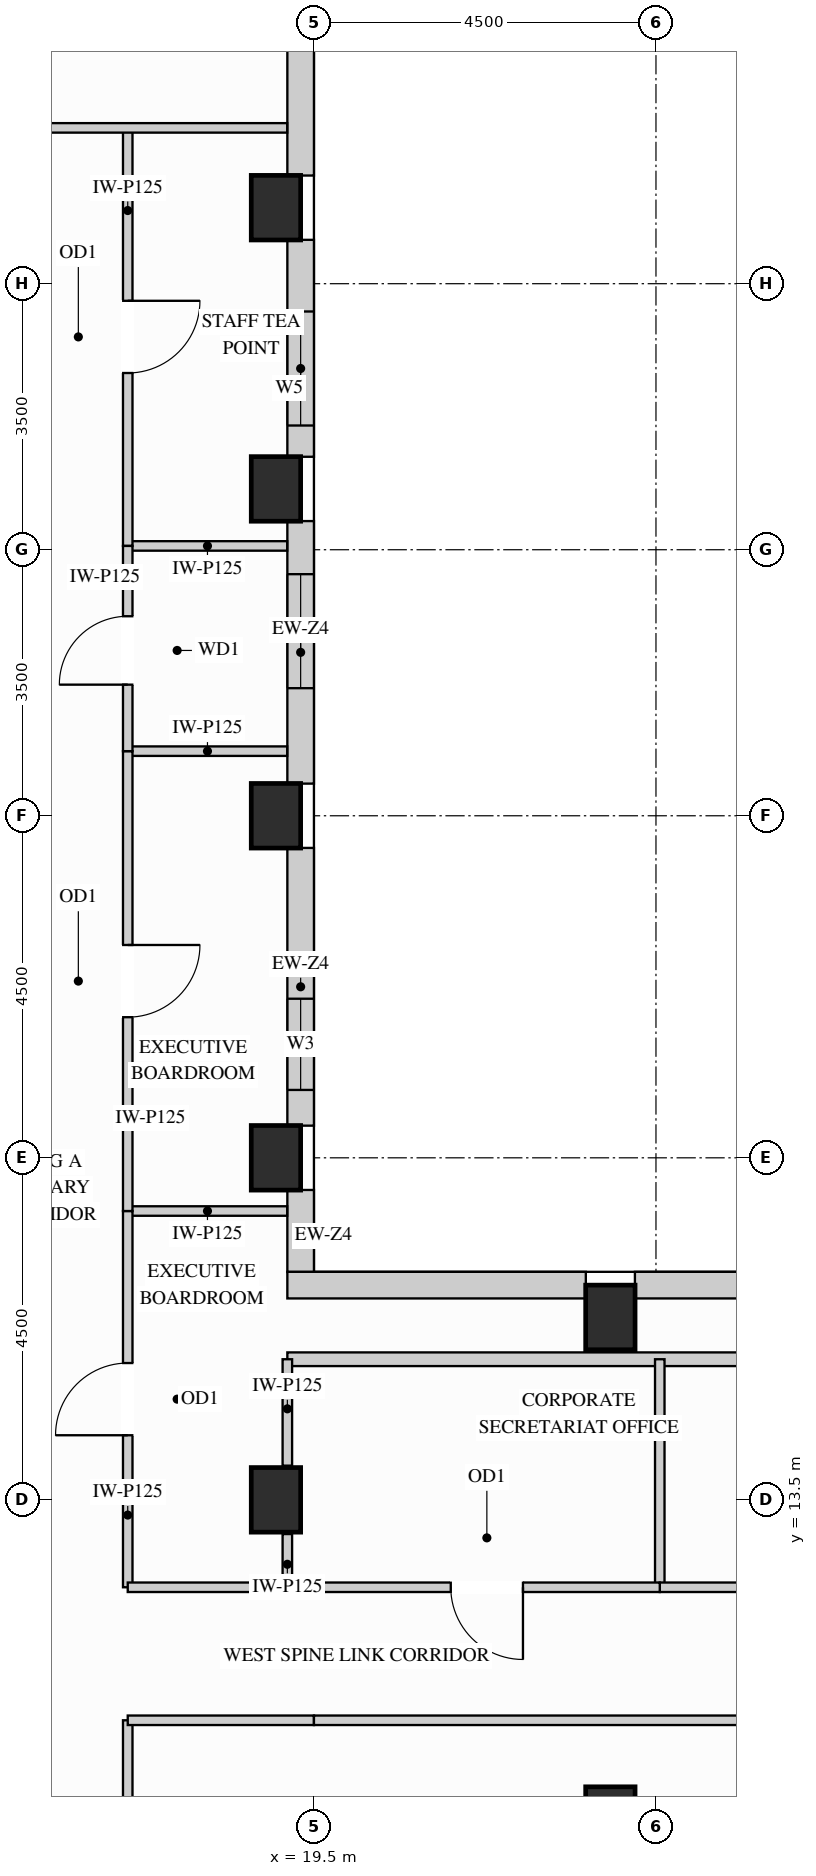
"""IFC4 building model, lengths in metres.
Left out: names, types, materials, properties, quantities, classifications, styles, units other than length and angle.
Written with IfcOpenShell. Run it as: python <this file> out.ifc"""

import sys

from ifc_helpers import new_model, si_unit, direction, frame, frame_2d, origin, origin_2d, place, context, subcontext, project, spatial, rectangle, extrude, source, transform, mapped, element, fill, save


model = new_model("IFC4")
c1 = context("Model", 3, precision=1e-05, world=origin(), true_north=direction((0.0, 1.0)))
c2 = subcontext(c1, "Body", "Model", "MODEL_VIEW")
j1 = project(units=[si_unit("LENGTHUNIT", "METRE"), si_unit("PLANEANGLEUNIT", "RADIAN")], contexts=[c1])
p1 = place(None, origin())
s1 = spatial("IfcSite", under=j1, at=p1, CompositionType="ELEMENT")
p2 = place(p1, origin())
s2 = spatial("IfcBuilding", under=s1, at=p2, CompositionType="ELEMENT")
p3 = place(p2, frame((0.0, 0.0, 244.8)))
s3 = spatial("IfcBuildingStorey", under=s2, at=p3, CompositionType="ELEMENT", Elevation=244.8)
m1 = source(origin(), c2, "Body", "SweptSolid", [
    extrude(rectangle(XDim=0.65, YDim=0.85, at=origin_2d()), origin(), (0.0, 0.0, 1.0), 3.4),
])
for number, where, z_axis, x_axis in (
    (1, (19.0, 13.5, 0.0), (0.0, 0.0, 1.0), (1.0, 0.0, 0.0)),
    (2, (19.0, 18.0, 0.0), (0.0, 0.0, 1.0), (1.0, 0.0, 0.0)),
    (3, (19.0, 22.5, 0.0), (0.0, 0.0, 1.0), (1.0, 0.0, 0.0)),
    (4, (19.0, 26.8, 0.0), (0.0, 0.0, 1.0), (1.0, 0.0, 0.0)),
    (5, (19.0, 30.5, 0.0), (0.0, 0.0, 1.0), (1.0, 0.0, 0.0)),
    (6, (23.4, 15.9, 0.0), (0.0, 0.0, 1.0), (1.0, 0.0, 0.0)),
    (7, (23.4, 9.3, 0.0), (0.0, 0.0, 1.0), (1.0, 0.0, 0.0)),
):
    element("IfcColumn", number, at=place(p3, frame(where, z_axis=z_axis, x_axis=x_axis)), inside=s3, PredefinedType="COLUMN", context=c2, shape_type="MappedRepresentation", body=[
        mapped(m1, transform((0.0, 0.0, 0.0), x_axis=(1.0, 0.0, 0.0), y_axis=(0.0, 1.0, 0.0), z_axis=(0.0, 0.0, 1.0))),
    ])
m2 = source(origin(), c2, "Body", "SweptSolid", [
    extrude(rectangle(XDim=1.079, YDim=0.35, at=frame_2d((0.54, 0.0))), origin(), (0.0, 0.0, 1.0), 2.619),
])
p4 = place(p3, frame((19.325, 16.498, 0.0), z_axis=(0.0, 0.0, 1.0), x_axis=(0.0, 1.0, 0.0)))
e8 = element("IfcWall", 8, at=p4, inside=s3, PredefinedType="SOLIDWALL", context=c2, shape_type="MappedRepresentation", body=[
    mapped(m2, transform((0.0, 0.0, 0.0), x_axis=(1.0, 0.0, 0.0), y_axis=(0.0, 1.0, 0.0), z_axis=(0.0, 0.0, 1.0))),
])
p5 = place(p3, frame((19.325, 18.423, 0.0), z_axis=(0.0, 0.0, 1.0), x_axis=(0.0, 1.0, 0.0)))
e9 = element("IfcWall", 9, at=p5, inside=s3, PredefinedType="SOLIDWALL", context=c2, shape_type="SweptSolid", body=[
    extrude(rectangle(XDim=3.654, YDim=0.35, at=frame_2d((1.827, 0.0))), origin(), (0.0, 0.0, 1.0), 2.619),
])
p6 = place(p5, frame((0.47, 0.0, 0.78)))
e10 = element("IfcOpeningElement", 10, at=p6, cuts=e9, PredefinedType="OPENING", context=c2, shape_type="SweptSolid", body=[
    extrude(rectangle(XDim=1.2, YDim=1.659, at=frame_2d((0.6, 0.83))), frame((0.0, 0.185, 0.0), z_axis=(0.0, -1.0, 0.0), x_axis=(1.0, 0.0, 0.0)), (0.0, 0.0, 1.0), 0.37),
])
p7 = place(p3, frame((19.325, 22.923, 0.0), z_axis=(0.0, 0.0, 1.0), x_axis=(0.0, 1.0, 0.0)))
e11 = element("IfcWall", 11, at=p7, inside=s3, PredefinedType="SOLIDWALL", context=c2, shape_type="SweptSolid", body=[
    extrude(rectangle(XDim=3.454, YDim=0.35, at=frame_2d((1.727, 0.0))), origin(), (0.0, 0.0, 1.0), 2.619),
])
p8 = place(p7, frame((1.256, 0.0, 0.78)))
e12 = element("IfcOpeningElement", 12, at=p8, cuts=e11, PredefinedType="OPENING", context=c2, shape_type="SweptSolid", body=[
    extrude(rectangle(XDim=1.5, YDim=1.659, at=frame_2d((0.75, 0.83))), frame((0.0, 0.185, 0.0), z_axis=(0.0, -1.0, 0.0), x_axis=(1.0, 0.0, 0.0)), (0.0, 0.0, 1.0), 0.37),
])
p9 = place(p3, frame((19.325, 27.223, 0.0), z_axis=(0.0, 0.0, 1.0), x_axis=(0.0, 1.0, 0.0)))
e13 = element("IfcWall", 13, at=p9, inside=s3, PredefinedType="SOLIDWALL", context=c2, shape_type="SweptSolid", body=[
    extrude(rectangle(XDim=2.854, YDim=0.35, at=frame_2d((1.427, 0.0))), origin(), (0.0, 0.0, 1.0), 2.619),
])
p10 = place(p9, frame((0.411, 0.0, 0.78)))
e14 = element("IfcOpeningElement", 14, at=p10, cuts=e13, PredefinedType="OPENING", context=c2, shape_type="SweptSolid", body=[
    extrude(rectangle(XDim=1.5, YDim=1.659, at=frame_2d((0.75, 0.83))), frame((0.0, 0.185, 0.0), z_axis=(0.0, -1.0, 0.0), x_axis=(1.0, 0.0, 0.0)), (0.0, 0.0, 1.0), 0.37),
])
m3 = source(origin(), c2, "Body", "SweptSolid", [
    extrude(rectangle(XDim=3.654, YDim=0.35, at=frame_2d((1.827, 0.0))), origin(), (0.0, 0.0, 1.0), 2.619),
])
p11 = place(p3, frame((19.325, 30.923, 0.0), z_axis=(0.0, 0.0, 1.0), x_axis=(0.0, 1.0, 0.0)))
e15 = element("IfcWall", 15, at=p11, inside=s3, PredefinedType="SOLIDWALL", context=c2, shape_type="MappedRepresentation", body=[
    mapped(m3, transform((0.0, 0.0, 0.0), x_axis=(1.0, 0.0, 0.0), y_axis=(0.0, 1.0, 0.0), z_axis=(0.0, 0.0, 1.0))),
])
m4 = source(origin(), c2, "Body", "SweptSolid", [
    extrude(rectangle(XDim=6.454, YDim=0.35, at=frame_2d((3.227, 0.0))), origin(), (0.0, 0.0, 1.0), 3.385),
])
p12 = place(p3, frame((30.177, 16.325, 0.0), z_axis=(0.0, 0.0, 1.0), x_axis=(-1.0, 0.0, 0.0)))
e16 = element("IfcWall", 16, at=p12, inside=s3, PredefinedType="SOLIDWALL", context=c2, shape_type="MappedRepresentation", body=[
    mapped(m4, transform((0.0, 0.0, 0.0), x_axis=(1.0, 0.0, 0.0), y_axis=(0.0, 1.0, 0.0), z_axis=(0.0, 0.0, 1.0))),
])
m5 = source(origin(), c2, "Body", "SweptSolid", [
    extrude(rectangle(XDim=3.927, YDim=0.35, at=frame_2d((1.963, 0.0))), origin(), (0.0, 0.0, 1.0), 3.385),
])
p13 = place(p3, frame((23.077, 16.325, 0.0), z_axis=(0.0, 0.0, 1.0), x_axis=(-1.0, 0.0, 0.0)))
e17 = element("IfcWall", 17, at=p13, inside=s3, PredefinedType="SOLIDWALL", context=c2, shape_type="MappedRepresentation", body=[
    mapped(m5, transform((0.0, 0.0, 0.0), x_axis=(1.0, 0.0, 0.0), y_axis=(0.0, 1.0, 0.0), z_axis=(0.0, 0.0, 1.0))),
])
m6 = source(origin(), c2, "Body", "SweptSolid", [
    extrude(rectangle(XDim=15.25, YDim=0.18, at=frame_2d((7.625, 0.0))), origin(), (0.0, 0.0, 1.0), 3.385),
])
p14 = place(p3, frame((19.15, 15.35, 0.0), z_axis=(0.0, 0.0, 1.0), x_axis=(1.0, 0.0, 0.0)))
e18 = element("IfcWall", 18, at=p14, inside=s3, PredefinedType="PARTITIONING", context=c2, shape_type="MappedRepresentation", body=[
    mapped(m6, transform((0.0, 0.0, 0.0), x_axis=(1.0, 0.0, 0.0), y_axis=(0.0, 1.0, 0.0), z_axis=(0.0, 0.0, 1.0))),
])
m7 = source(origin(), c2, "Body", "SweptSolid", [
    extrude(rectangle(XDim=2.098, YDim=0.125, at=frame_2d((1.049, 0.0))), origin(), (0.0, 0.0, 1.0), 3.385),
])
for number, where, z_axis, x_axis in (
    (19, (17.05, 17.3, 0.0), (0.0, 0.0, 1.0), (1.0, 0.0, 0.0)),
    (20, (17.05, 23.35, 0.0), (0.0, 0.0, 1.0), (1.0, 0.0, 0.0)),
    (21, (17.05, 26.05, 0.0), (0.0, 0.0, 1.0), (1.0, 0.0, 0.0)),
):
    element("IfcWall", number, at=place(p3, frame(where, z_axis=z_axis, x_axis=x_axis)), inside=s3, PredefinedType="PARTITIONING", context=c2, shape_type="MappedRepresentation", body=[
        mapped(m7, transform((0.0, 0.0, 0.0), x_axis=(1.0, 0.0, 0.0), y_axis=(0.0, 1.0, 0.0), z_axis=(0.0, 0.0, 1.0))),
    ])
m8 = source(origin(), c2, "Body", "SweptSolid", [
    extrude(rectangle(XDim=0.7, YDim=0.125, at=frame_2d((0.35, 0.0))), origin(), (0.0, 0.0, 1.0), 2.773),
])
p15 = place(p3, frame((19.15, 12.35, 0.0), z_axis=(0.0, 0.0, 1.0), x_axis=(0.0, 1.0, 0.0)))
e22 = element("IfcWall", 22, at=p15, inside=s3, PredefinedType="PARTITIONING", context=c2, shape_type="MappedRepresentation", body=[
    mapped(m8, transform((0.0, 0.0, 0.0), x_axis=(1.0, 0.0, 0.0), y_axis=(0.0, 1.0, 0.0), z_axis=(0.0, 0.0, 1.0))),
])
m9 = source(origin(), c2, "Body", "SweptSolid", [
    extrude(rectangle(XDim=1.4, YDim=0.125, at=frame_2d((0.7, 0.0))), origin(), (0.0, 0.0, 1.0), 2.619),
])
p16 = place(p3, frame((19.15, 13.95, 0.0), z_axis=(0.0, 0.0, 1.0), x_axis=(0.0, 1.0, 0.0)))
e23 = element("IfcWall", 23, at=p16, inside=s3, PredefinedType="PARTITIONING", context=c2, shape_type="MappedRepresentation", body=[
    mapped(m9, transform((0.0, 0.0, 0.0), x_axis=(1.0, 0.0, 0.0), y_axis=(0.0, 1.0, 0.0), z_axis=(0.0, 0.0, 1.0))),
])
p17 = place(p3, frame((17.05, 12.35, 0.0), z_axis=(0.0, 0.0, 1.0), x_axis=(0.0, 1.0, 0.0)))
e24 = element("IfcWall", 24, at=p17, inside=s3, PredefinedType="PARTITIONING", context=c2, shape_type="SweptSolid", body=[
    extrude(rectangle(XDim=4.95, YDim=0.125, at=frame_2d((2.475, 0.0))), origin(), (0.0, 0.0, 1.0), 3.385),
])
p18 = place(p17, frame((2.0, 0.0, 0.0)))
e25 = element("IfcOpeningElement", 25, at=p18, cuts=e24, PredefinedType="OPENING", context=c2, shape_type="SweptSolid", body=[
    extrude(rectangle(XDim=0.95, YDim=2.15, at=frame_2d((0.475, 1.075))), frame((0.0, 0.073, 0.0), z_axis=(0.0, -1.0, 0.0), x_axis=(1.0, 0.0, 0.0)), (0.0, 0.0, 1.0), 0.145),
])
p19 = place(p3, frame((17.05, 17.3, 0.0), z_axis=(0.0, 0.0, 1.0), x_axis=(0.0, 1.0, 0.0)))
e26 = element("IfcWall", 26, at=p19, inside=s3, PredefinedType="PARTITIONING", context=c2, shape_type="SweptSolid", body=[
    extrude(rectangle(XDim=6.05, YDim=0.125, at=frame_2d((3.025, 0.0))), origin(), (0.0, 0.0, 1.0), 3.385),
])
p20 = place(p19, frame((2.55, 0.0, 0.0)))
e27 = element("IfcOpeningElement", 27, at=p20, cuts=e26, PredefinedType="OPENING", context=c2, shape_type="SweptSolid", body=[
    extrude(rectangle(XDim=0.95, YDim=2.15, at=frame_2d((0.475, 1.075))), frame((0.0, 0.073, 0.0), z_axis=(0.0, -1.0, 0.0), x_axis=(1.0, 0.0, 0.0)), (0.0, 0.0, 1.0), 0.145),
])
p21 = place(p3, frame((17.05, 26.05, 0.0), z_axis=(0.0, 0.0, 1.0), x_axis=(0.0, 1.0, 0.0)))
e28 = element("IfcWall", 28, at=p21, inside=s3, PredefinedType="PARTITIONING", context=c2, shape_type="SweptSolid", body=[
    extrude(rectangle(XDim=5.5, YDim=0.125, at=frame_2d((2.75, 0.0))), origin(), (0.0, 0.0, 1.0), 3.385),
])
p22 = place(p21, frame((2.275, 0.0, 0.0)))
e29 = element("IfcOpeningElement", 29, at=p22, cuts=e28, PredefinedType="OPENING", context=c2, shape_type="SweptSolid", body=[
    extrude(rectangle(XDim=0.95, YDim=2.15, at=frame_2d((0.475, 1.075))), frame((0.0, 0.073, 0.0), z_axis=(0.0, -1.0, 0.0), x_axis=(1.0, 0.0, 0.0)), (0.0, 0.0, 1.0), 0.145),
])
p23 = place(p3, frame((17.05, 4.95, 0.0), z_axis=(0.0, 0.0, 1.0), x_axis=(0.0, 1.0, 0.0)))
e30 = element("IfcWall", 30, at=p23, inside=s3, PredefinedType="PARTITIONING", context=c2, shape_type="SweptSolid", body=[
    extrude(rectangle(XDim=5.65, YDim=0.125, at=frame_2d((2.825, 0.0))), origin(), (0.0, 0.0, 1.0), 3.385),
])
p24 = place(p23, frame((2.35, 0.0, 0.0)))
e31 = element("IfcOpeningElement", 31, at=p24, cuts=e30, PredefinedType="OPENING", context=c2, shape_type="SweptSolid", body=[
    extrude(rectangle(XDim=0.95, YDim=2.15, at=frame_2d((0.475, 1.075))), frame((0.0, 0.073, 0.0), z_axis=(0.0, -1.0, 0.0), x_axis=(1.0, 0.0, 0.0)), (0.0, 0.0, 1.0), 0.145),
])
p25 = place(p3, frame((17.05, 23.35, 0.0), z_axis=(0.0, 0.0, 1.0), x_axis=(0.0, 1.0, 0.0)))
e32 = element("IfcWall", 32, at=p25, inside=s3, PredefinedType="PARTITIONING", context=c2, shape_type="SweptSolid", body=[
    extrude(rectangle(XDim=2.7, YDim=0.125, at=frame_2d((1.35, 0.0))), origin(), (0.0, 0.0, 1.0), 3.385),
])
p26 = place(p25, frame((0.875, 0.0, 0.0)))
e33 = element("IfcOpeningElement", 33, at=p26, cuts=e32, PredefinedType="OPENING", context=c2, shape_type="SweptSolid", body=[
    extrude(rectangle(XDim=0.9, YDim=2.15, at=frame_2d((0.45, 1.075))), frame((0.0, 0.073, 0.0), z_axis=(0.0, -1.0, 0.0), x_axis=(1.0, 0.0, 0.0)), (0.0, 0.0, 1.0), 0.145),
])
m10 = source(origin(), c2, "Body", "SweptSolid", [
    extrude(rectangle(XDim=5.798, YDim=0.125, at=frame_2d((2.899, 0.0))), origin(), (0.0, 0.0, 1.0), 3.385),
])
p27 = place(p3, frame((13.35, 31.55, 0.0), z_axis=(0.0, 0.0, 1.0), x_axis=(1.0, 0.0, 0.0)))
e34 = element("IfcWall", 34, at=p27, inside=s3, PredefinedType="PARTITIONING", context=c2, shape_type="MappedRepresentation", body=[
    mapped(m10, transform((0.0, 0.0, 0.0), x_axis=(1.0, 0.0, 0.0), y_axis=(0.0, 1.0, 0.0), z_axis=(0.0, 0.0, 1.0))),
])
m11 = source(origin(), c2, "Body", "SweptSolid", [
    extrude(rectangle(XDim=3.0, YDim=0.125, at=frame_2d((1.5, 0.0))), origin(), (0.0, 0.0, 1.0), 3.385),
])
p28 = place(p3, frame((24.05, 12.35, 0.0), z_axis=(0.0, 0.0, 1.0), x_axis=(0.0, 1.0, 0.0)))
e35 = element("IfcWall", 35, at=p28, inside=s3, PredefinedType="PARTITIONING", context=c2, shape_type="MappedRepresentation", body=[
    mapped(m11, transform((0.0, 0.0, 0.0), x_axis=(1.0, 0.0, 0.0), y_axis=(0.0, 1.0, 0.0), z_axis=(0.0, 0.0, 1.0))),
])
p29 = place(p3, frame((24.05, 12.35, 0.0), z_axis=(0.0, 0.0, 1.0), x_axis=(1.0, 0.0, 0.0)))
e36 = element("IfcWall", 36, at=p29, inside=s3, PredefinedType="PARTITIONING", context=c2, shape_type="SweptSolid", body=[
    extrude(rectangle(XDim=5.8, YDim=0.125, at=frame_2d((2.9, 0.0))), origin(), (0.0, 0.0, 1.0), 3.385),
])
p30 = place(p29, frame((2.425, 0.0, 0.0)))
e37 = element("IfcOpeningElement", 37, at=p30, cuts=e36, PredefinedType="OPENING", context=c2, shape_type="SweptSolid", body=[
    extrude(rectangle(XDim=0.95, YDim=2.15, at=frame_2d((0.475, 1.075))), frame((0.0, 0.073, 0.0), z_axis=(0.0, -1.0, 0.0), x_axis=(1.0, 0.0, 0.0)), (0.0, 0.0, 1.0), 0.145),
])
m12 = source(origin(), c2, "Body", "SweptSolid", [
    extrude(rectangle(XDim=2.45, YDim=0.125, at=frame_2d((1.225, 0.0))), origin(), (0.0, 0.0, 1.0), 3.385),
])
p31 = place(p3, frame((17.05, 12.35, 0.0), z_axis=(0.0, 0.0, 1.0), x_axis=(1.0, 0.0, 0.0)))
e38 = element("IfcWall", 38, at=p31, inside=s3, PredefinedType="PARTITIONING", context=c2, shape_type="MappedRepresentation", body=[
    mapped(m12, transform((0.0, 0.0, 0.0), x_axis=(1.0, 0.0, 0.0), y_axis=(0.0, 1.0, 0.0), z_axis=(0.0, 0.0, 1.0))),
])
p32 = place(p3, frame((19.5, 12.35, 0.0), z_axis=(0.0, 0.0, 1.0), x_axis=(1.0, 0.0, 0.0)))
e39 = element("IfcWall", 39, at=p32, inside=s3, PredefinedType="PARTITIONING", context=c2, shape_type="SweptSolid", body=[
    extrude(rectangle(XDim=4.55, YDim=0.125, at=frame_2d((2.275, 0.0))), origin(), (0.0, 0.0, 1.0), 3.385),
])
p33 = place(p32, frame((1.8, 0.0, 0.0)))
e40 = element("IfcOpeningElement", 40, at=p33, cuts=e39, PredefinedType="OPENING", context=c2, shape_type="SweptSolid", body=[
    extrude(rectangle(XDim=0.95, YDim=2.15, at=frame_2d((0.475, 1.075))), frame((0.0, 0.073, 0.0), z_axis=(0.0, -1.0, 0.0), x_axis=(1.0, 0.0, 0.0)), (0.0, 0.0, 1.0), 0.145),
])
p34 = place(p3, frame((17.05, 10.6, 0.0), z_axis=(0.0, 0.0, 1.0), x_axis=(1.0, 0.0, 0.0)))
e41 = element("IfcWall", 41, at=p34, inside=s3, PredefinedType="PARTITIONING", context=c2, shape_type="MappedRepresentation", body=[
    mapped(m12, transform((0.0, 0.0, 0.0), x_axis=(1.0, 0.0, 0.0), y_axis=(0.0, 1.0, 0.0), z_axis=(0.0, 0.0, 1.0))),
])
p35 = place(p3, frame((19.5, 10.6, 0.0), z_axis=(0.0, 0.0, 1.0), x_axis=(1.0, 0.0, 0.0)))
e42 = element("IfcWall", 42, at=p35, inside=s3, PredefinedType="PARTITIONING", context=c2, shape_type="SweptSolid", body=[
    extrude(rectangle(XDim=14.9, YDim=0.125, at=frame_2d((7.45, 0.0))), origin(), (0.0, 0.0, 1.0), 3.385),
])
p36 = place(p35, frame((6.975, 0.0, 0.0)))
e43 = element("IfcOpeningElement", 43, at=p36, cuts=e42, PredefinedType="OPENING", context=c2, shape_type="SweptSolid", body=[
    extrude(rectangle(XDim=0.95, YDim=2.15, at=frame_2d((0.475, 1.075))), frame((0.0, 0.073, 0.0), z_axis=(0.0, -1.0, 0.0), x_axis=(1.0, 0.0, 0.0)), (0.0, 0.0, 1.0), 0.145),
])
m13 = source(origin(), c2, "Body", "SweptSolid", [
    extrude(rectangle(XDim=0.95, YDim=2.15, at=frame_2d((0.475, 1.075))), frame((0.0, 0.025, 0.0), z_axis=(0.0, -1.0, 0.0), x_axis=(1.0, 0.0, 0.0)), (0.0, 0.0, 1.0), 0.05),
])
p37 = place(p18, origin())
e44 = element("IfcDoor", 44, at=p37, inside=s3, OperationType="SINGLE_SWING_LEFT", PredefinedType="DOOR", context=c2, shape_type="MappedRepresentation", body=[
    mapped(m13, transform((0.0, 0.0, 0.0), x_axis=(1.0, 0.0, 0.0), y_axis=(0.0, 1.0, 0.0), z_axis=(0.0, 0.0, 1.0))),
])
fill(e25, e44)
p38 = place(p20, origin())
e45 = element("IfcDoor", 45, at=p38, inside=s3, OperationType="SINGLE_SWING_RIGHT", PredefinedType="DOOR", context=c2, shape_type="MappedRepresentation", body=[
    mapped(m13, transform((0.0, 0.0, 0.0), x_axis=(1.0, 0.0, 0.0), y_axis=(0.0, 1.0, 0.0), z_axis=(0.0, 0.0, 1.0))),
])
fill(e27, e45)
p39 = place(p22, origin())
e46 = element("IfcDoor", 46, at=p39, inside=s3, OperationType="SINGLE_SWING_RIGHT", PredefinedType="DOOR", context=c2, shape_type="MappedRepresentation", body=[
    mapped(m13, transform((0.0, 0.0, 0.0), x_axis=(1.0, 0.0, 0.0), y_axis=(0.0, 1.0, 0.0), z_axis=(0.0, 0.0, 1.0))),
])
fill(e29, e46)
p40 = place(p33, origin())
e47 = element("IfcDoor", 47, at=p40, inside=s3, OperationType="SINGLE_SWING_RIGHT", PredefinedType="DOOR", context=c2, shape_type="MappedRepresentation", body=[
    mapped(m13, transform((0.0, 0.0, 0.0), x_axis=(1.0, 0.0, 0.0), y_axis=(0.0, 1.0, 0.0), z_axis=(0.0, 0.0, 1.0))),
])
fill(e40, e47)
m14 = source(origin(), c2, "Body", "SweptSolid", [
    extrude(rectangle(XDim=0.9, YDim=2.15, at=frame_2d((0.45, 1.075))), frame((0.0, 0.025, 0.0), z_axis=(0.0, -1.0, 0.0), x_axis=(1.0, 0.0, 0.0)), (0.0, 0.0, 1.0), 0.05),
])
p41 = place(p26, origin())
e48 = element("IfcDoor", 48, at=p41, inside=s3, OperationType="SINGLE_SWING_LEFT", PredefinedType="DOOR", context=c2, shape_type="MappedRepresentation", body=[
    mapped(m14, transform((0.0, 0.0, 0.0), x_axis=(1.0, 0.0, 0.0), y_axis=(0.0, 1.0, 0.0), z_axis=(0.0, 0.0, 1.0))),
])
fill(e33, e48)
m15 = source(origin(), c2, "Body", "SweptSolid", [
    extrude(rectangle(XDim=1.2, YDim=1.659, at=frame_2d((0.6, 0.83))), frame((0.0, 0.03, 0.0), z_axis=(0.0, -1.0, 0.0), x_axis=(1.0, 0.0, 0.0)), (0.0, 0.0, 1.0), 0.06),
])
p42 = place(p6, origin())
e49 = element("IfcWindow", 49, at=p42, inside=s3, PartitioningType="SINGLE_PANEL", PredefinedType="WINDOW", context=c2, shape_type="MappedRepresentation", body=[
    mapped(m15, transform((0.0, 0.0, 0.0), x_axis=(1.0, 0.0, 0.0), y_axis=(0.0, 1.0, 0.0), z_axis=(0.0, 0.0, 1.0))),
])
fill(e10, e49)
m16 = source(origin(), c2, "Body", "SweptSolid", [
    extrude(rectangle(XDim=1.5, YDim=1.659, at=frame_2d((0.75, 0.83))), frame((0.0, 0.03, 0.0), z_axis=(0.0, -1.0, 0.0), x_axis=(1.0, 0.0, 0.0)), (0.0, 0.0, 1.0), 0.06),
])
p43 = place(p8, origin())
e50 = element("IfcWindow", 50, at=p43, inside=s3, PartitioningType="SINGLE_PANEL", PredefinedType="WINDOW", context=c2, shape_type="MappedRepresentation", body=[
    mapped(m16, transform((0.0, 0.0, 0.0), x_axis=(1.0, 0.0, 0.0), y_axis=(0.0, 1.0, 0.0), z_axis=(0.0, 0.0, 1.0))),
])
fill(e12, e50)
p44 = place(p10, origin())
e51 = element("IfcWindow", 51, at=p44, inside=s3, PartitioningType="SINGLE_PANEL", PredefinedType="WINDOW", context=c2, shape_type="MappedRepresentation", body=[
    mapped(m16, transform((0.0, 0.0, 0.0), x_axis=(1.0, 0.0, 0.0), y_axis=(0.0, 1.0, 0.0), z_axis=(0.0, 0.0, 1.0))),
])
fill(e14, e51)
save(model, sys.argv[1])
